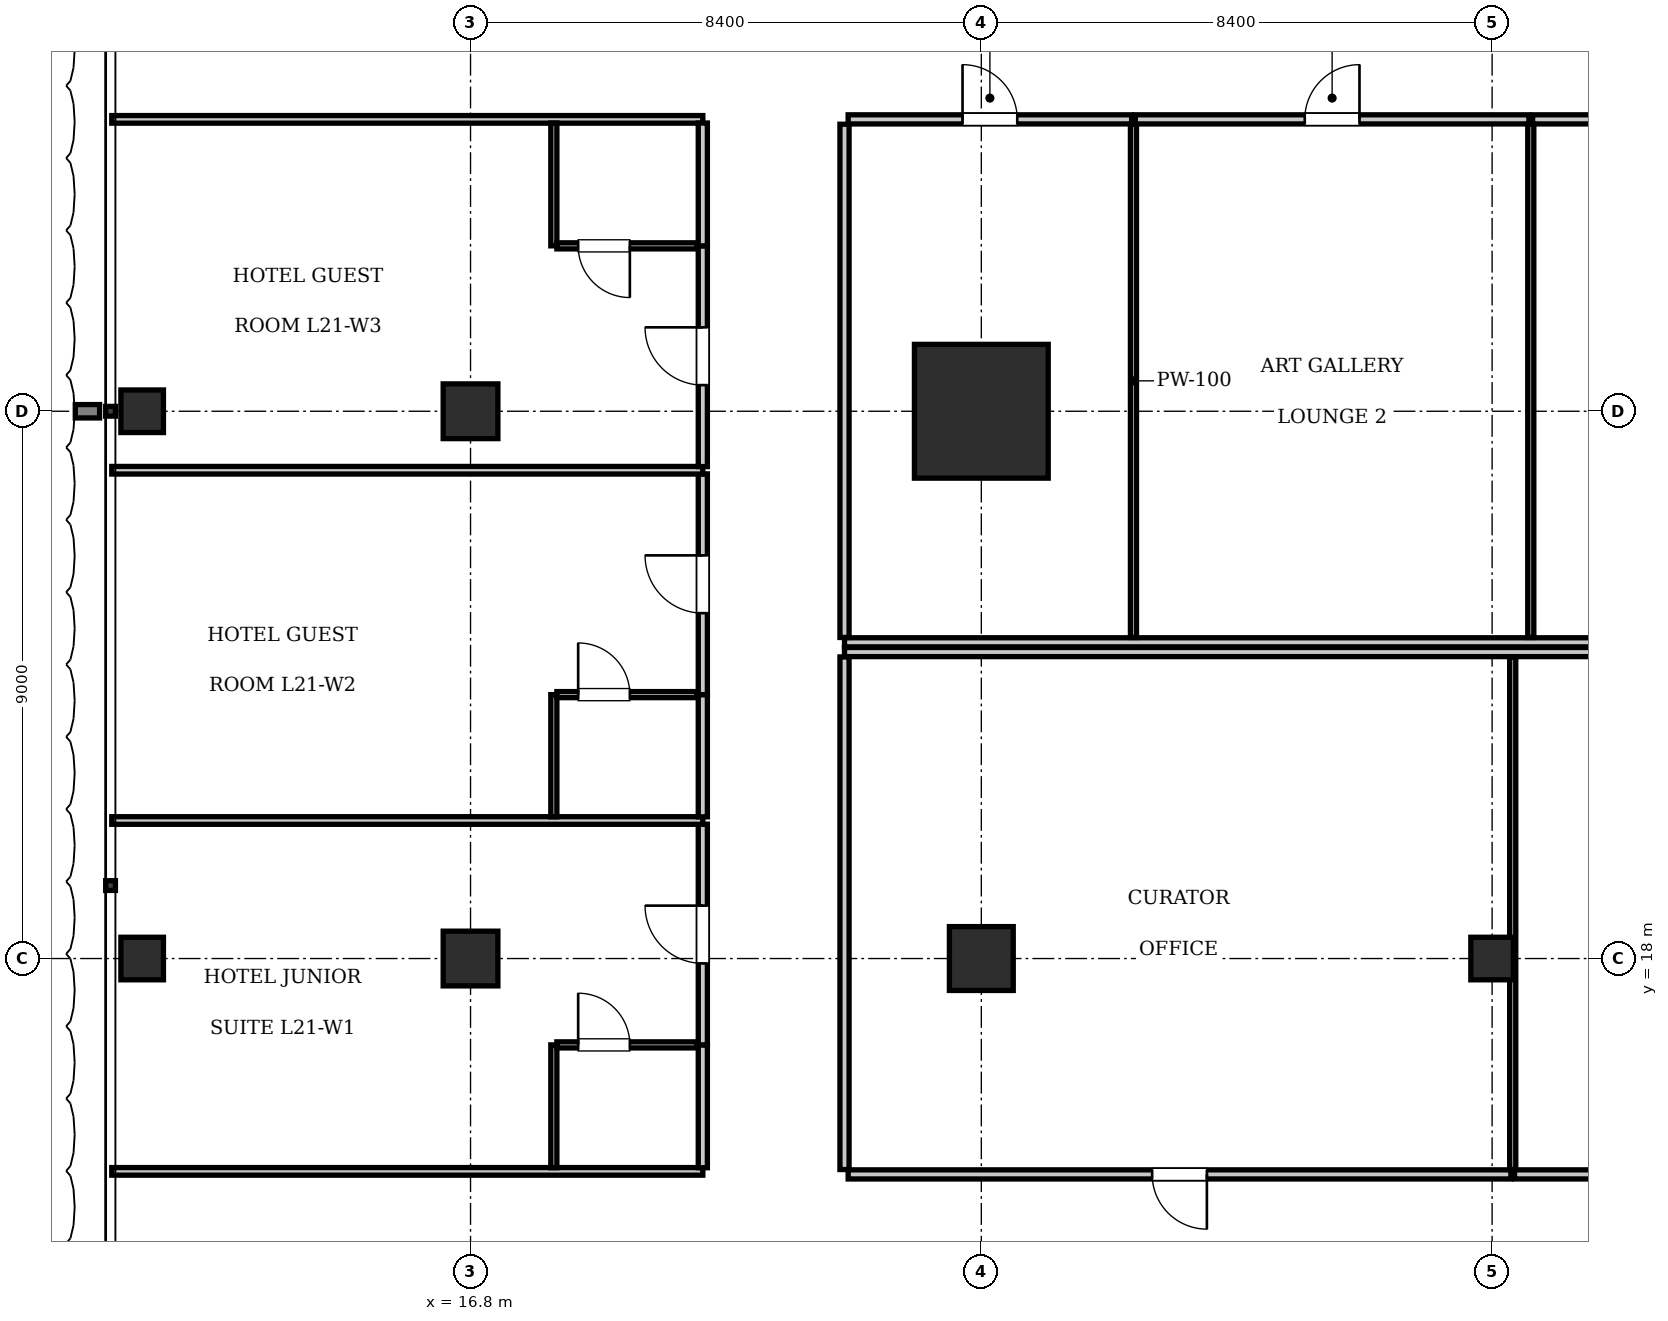
"""IFC4 building model, lengths in metres.
Left out: names, types, materials, properties, quantities, classifications, styles, units other than length and angle.
Written with IfcOpenShell. Run it as: python <this file> out.ifc"""

import sys

from ifc_helpers import new_model, si_unit, direction, frame, frame_2d, origin, origin_2d, place, context, subcontext, project, spatial, rectangle, i_section, extrude, element, fill, save


model = new_model("IFC4")
c1 = context("Model", 3, precision=1e-05, world=origin(), true_north=direction((0.0, 1.0)))
c2 = subcontext(c1, "Body", "Model", "MODEL_VIEW")
j1 = project(units=[si_unit("LENGTHUNIT", "METRE"), si_unit("PLANEANGLEUNIT", "RADIAN")], contexts=[c1])
p1 = place(None, origin())
s1 = spatial("IfcSite", under=j1, at=p1, CompositionType="ELEMENT")
p2 = place(p1, origin())
s2 = spatial("IfcBuilding", under=s1, at=p2, CompositionType="ELEMENT")
p3 = place(p2, frame((0.0, 0.0, 88.55)))
s3 = spatial("IfcBuildingStorey", under=s2, at=p3, CompositionType="ELEMENT", Elevation=88.55)
p4 = place(p3, frame((25.2, 27.0, 0.0), z_axis=(0.0, 0.0, 1.0), x_axis=(1.0, 0.0, 0.0)))
e1 = element("IfcColumn", 1, at=p4, inside=s3, PredefinedType="COLUMN", context=c2, shape_type="SweptSolid", body=[
    extrude(rectangle(XDim=2.2, YDim=2.2, at=origin_2d()), origin(), (0.0, 0.0, 1.0), 3.85),
])
p5 = place(p3, frame((25.2, 18.0, 0.0), z_axis=(0.0, 0.0, 1.0), x_axis=(1.0, 0.0, 0.0)))
e2 = element("IfcColumn", 2, at=p5, inside=s3, PredefinedType="COLUMN", context=c2, shape_type="SweptSolid", body=[
    extrude(rectangle(XDim=1.05, YDim=1.05, at=origin_2d()), origin(), (0.0, 0.0, 1.0), 3.85),
])
p6 = place(p3, frame((33.6, 18.0, 0.0), z_axis=(0.0, 0.0, 1.0), x_axis=(1.0, 0.0, 0.0)))
e3 = element("IfcColumn", 3, at=p6, inside=s3, PredefinedType="COLUMN", context=c2, shape_type="SweptSolid", body=[
    extrude(i_section(OverallWidth=0.7, OverallDepth=0.7, WebThickness=0.028, FlangeThickness=0.044, at=origin_2d()), origin(), (0.0, 0.0, 1.0), 3.85),
])
for number, where, z_axis, x_axis in (
    (4, (16.8, 18.0, 0.0), (0.0, 0.0, 1.0), (1.0, 0.0, 0.0)),
    (5, (16.8, 27.0, 0.0), (0.0, 0.0, 1.0), (1.0, 0.0, 0.0)),
):
    element("IfcColumn", number, at=place(p3, frame(where, z_axis=z_axis, x_axis=x_axis)), inside=s3, PredefinedType="COLUMN", context=c2, shape_type="SweptSolid", body=[
        extrude(rectangle(XDim=0.9, YDim=0.9, at=origin_2d()), origin(), (0.0, 0.0, 1.0), 3.85),
    ])
for number, where, z_axis, x_axis in (
    (6, (11.4, 18.0, 0.0), (0.0, 0.0, 1.0), (1.0, 0.0, 0.0)),
    (7, (11.4, 27.0, 0.0), (0.0, 0.0, 1.0), (1.0, 0.0, 0.0)),
):
    element("IfcColumn", number, at=place(p3, frame(where, z_axis=z_axis, x_axis=x_axis)), inside=s3, PredefinedType="COLUMN", context=c2, shape_type="SweptSolid", body=[
        extrude(i_section(OverallWidth=0.7, OverallDepth=0.7, WebThickness=0.028, FlangeThickness=0.044, at=origin_2d()), origin(), (0.0, 0.0, 1.0), 3.85),
    ])
p7 = place(p3, frame((22.95, 23.2, 0.0), z_axis=(0.0, 0.0, 1.0), x_axis=(1.0, 0.0, 0.0)))
e8 = element("IfcWall", 8, at=p7, inside=s3, PredefinedType="PARTITIONING", context=c2, shape_type="SweptSolid", body=[
    extrude(rectangle(XDim=29.7, YDim=0.15, at=frame_2d((14.85, 0.0))), origin(), (0.0, 0.0, 1.0), 3.61),
])
p8 = place(p3, frame((22.95, 23.28, 0.0), z_axis=(0.0, 0.0, 1.0), x_axis=(0.0, 1.0, 0.0)))
e9 = element("IfcWall", 9, at=p8, inside=s3, PredefinedType="PARTITIONING", context=c2, shape_type="SweptSolid", body=[
    extrude(rectangle(XDim=8.44, YDim=0.15, at=frame_2d((4.22, 0.0))), origin(), (0.0, 0.0, 1.0), 3.61),
])
p9 = place(p3, frame((23.01, 31.8, 0.0), z_axis=(0.0, 0.0, 1.0), x_axis=(1.0, 0.0, 0.0)))
e10 = element("IfcWall", 10, at=p9, inside=s3, PredefinedType="PARTITIONING", context=c2, shape_type="SweptSolid", body=[
    extrude(rectangle(XDim=4.662, YDim=0.15, at=frame_2d((2.331, 0.0))), origin(), (0.0, 0.0, 1.0), 3.61),
])
p10 = place(p9, frame((1.881, 0.0, 0.0)))
e11 = element("IfcOpeningElement", 11, at=p10, cuts=e10, PredefinedType="OPENING", context=c2, shape_type="SweptSolid", body=[
    extrude(rectangle(XDim=0.9, YDim=2.1, at=frame_2d((0.45, 1.05))), frame((0.0, 0.085, 0.0), z_axis=(0.0, -1.0, 0.0), x_axis=(1.0, 0.0, 0.0)), (0.0, 0.0, 1.0), 0.17),
])
p11 = place(p3, frame((27.702, 23.28, 0.0), z_axis=(0.0, 0.0, 1.0), x_axis=(0.0, 1.0, 0.0)))
e12 = element("IfcWall", 12, at=p11, inside=s3, PredefinedType="PARTITIONING", context=c2, shape_type="SweptSolid", body=[
    extrude(rectangle(XDim=8.44, YDim=0.1, at=frame_2d((4.22, 0.0))), origin(), (0.0, 0.0, 1.0), 3.61),
])
p12 = place(p3, frame((27.732, 31.8, 0.0), z_axis=(0.0, 0.0, 1.0), x_axis=(1.0, 0.0, 0.0)))
e13 = element("IfcWall", 13, at=p12, inside=s3, PredefinedType="PARTITIONING", context=c2, shape_type="SweptSolid", body=[
    extrude(rectangle(XDim=6.474, YDim=0.15, at=frame_2d((3.237, 0.0))), origin(), (0.0, 0.0, 1.0), 3.61),
])
p13 = place(p12, frame((2.787, 0.0, 0.0)))
e14 = element("IfcOpeningElement", 14, at=p13, cuts=e13, PredefinedType="OPENING", context=c2, shape_type="SweptSolid", body=[
    extrude(rectangle(XDim=0.9, YDim=2.1, at=frame_2d((0.45, 1.05))), frame((0.0, 0.085, 0.0), z_axis=(0.0, -1.0, 0.0), x_axis=(1.0, 0.0, 0.0)), (0.0, 0.0, 1.0), 0.17),
])
p14 = place(p3, frame((34.236, 23.28, 0.0), z_axis=(0.0, 0.0, 1.0), x_axis=(0.0, 1.0, 0.0)))
e15 = element("IfcWall", 15, at=p14, inside=s3, PredefinedType="PARTITIONING", context=c2, shape_type="SweptSolid", body=[
    extrude(rectangle(XDim=8.44, YDim=0.1, at=frame_2d((4.22, 0.0))), origin(), (0.0, 0.0, 1.0), 3.61),
])
p15 = place(p3, frame((34.266, 31.8, 0.0), z_axis=(0.0, 0.0, 1.0), x_axis=(1.0, 0.0, 0.0)))
e16 = element("IfcWall", 16, at=p15, inside=s3, PredefinedType="PARTITIONING", context=c2, shape_type="SweptSolid", body=[
    extrude(rectangle(XDim=8.256, YDim=0.15, at=frame_2d((4.128, 0.0))), origin(), (0.0, 0.0, 1.0), 3.61),
])
p16 = place(p15, frame((3.678, 0.0, 0.0)))
e17 = element("IfcOpeningElement", 17, at=p16, cuts=e16, PredefinedType="OPENING", context=c2, shape_type="SweptSolid", body=[
    extrude(rectangle(XDim=0.9, YDim=2.1, at=frame_2d((0.45, 1.05))), frame((0.0, 0.085, 0.0), z_axis=(0.0, -1.0, 0.0), x_axis=(1.0, 0.0, 0.0)), (0.0, 0.0, 1.0), 0.17),
])
p17 = place(p3, frame((22.95, 23.04, 0.0), z_axis=(0.0, 0.0, 1.0), x_axis=(1.0, 0.0, 0.0)))
e18 = element("IfcWall", 18, at=p17, inside=s3, PredefinedType="PARTITIONING", context=c2, shape_type="SweptSolid", body=[
    extrude(rectangle(XDim=29.7, YDim=0.15, at=frame_2d((14.85, 0.0))), origin(), (0.0, 0.0, 1.0), 3.61),
])
p18 = place(p3, frame((22.95, 14.53, 0.0), z_axis=(0.0, 0.0, 1.0), x_axis=(0.0, 1.0, 0.0)))
e19 = element("IfcWall", 19, at=p18, inside=s3, PredefinedType="PARTITIONING", context=c2, shape_type="SweptSolid", body=[
    extrude(rectangle(XDim=8.43, YDim=0.15, at=frame_2d((4.215, 0.0))), origin(), (0.0, 0.0, 1.0), 3.61),
])
p19 = place(p3, frame((23.01, 14.45, 0.0), z_axis=(0.0, 0.0, 1.0), x_axis=(1.0, 0.0, 0.0)))
e20 = element("IfcWall", 20, at=p19, inside=s3, PredefinedType="PARTITIONING", context=c2, shape_type="SweptSolid", body=[
    extrude(rectangle(XDim=10.899, YDim=0.15, at=frame_2d((5.449, 0.0))), origin(), (0.0, 0.0, 1.0), 3.61),
])
p20 = place(p19, frame((5.0, 0.0, 0.0)))
e21 = element("IfcOpeningElement", 21, at=p20, cuts=e20, PredefinedType="OPENING", context=c2, shape_type="SweptSolid", body=[
    extrude(rectangle(XDim=0.9, YDim=2.1, at=frame_2d((0.45, 1.05))), frame((0.0, 0.085, 0.0), z_axis=(0.0, -1.0, 0.0), x_axis=(1.0, 0.0, 0.0)), (0.0, 0.0, 1.0), 0.17),
])
p21 = place(p3, frame((33.939, 14.53, 0.0), z_axis=(0.0, 0.0, 1.0), x_axis=(0.0, 1.0, 0.0)))
e22 = element("IfcWall", 22, at=p21, inside=s3, PredefinedType="PARTITIONING", context=c2, shape_type="SweptSolid", body=[
    extrude(rectangle(XDim=8.43, YDim=0.1, at=frame_2d((4.215, 0.0))), origin(), (0.0, 0.0, 1.0), 3.61),
])
p22 = place(p3, frame((33.969, 14.45, 0.0), z_axis=(0.0, 0.0, 1.0), x_axis=(1.0, 0.0, 0.0)))
e23 = element("IfcWall", 23, at=p22, inside=s3, PredefinedType="PARTITIONING", context=c2, shape_type="SweptSolid", body=[
    extrude(rectangle(XDim=18.621, YDim=0.15, at=frame_2d((9.311, 0.0))), origin(), (0.0, 0.0, 1.0), 3.61),
])
p23 = place(p22, frame((8.861, 0.0, 0.0)))
e24 = element("IfcOpeningElement", 24, at=p23, cuts=e23, PredefinedType="OPENING", context=c2, shape_type="SweptSolid", body=[
    extrude(rectangle(XDim=0.9, YDim=2.1, at=frame_2d((0.45, 1.05))), frame((0.0, 0.085, 0.0), z_axis=(0.0, -1.0, 0.0), x_axis=(1.0, 0.0, 0.0)), (0.0, 0.0, 1.0), 0.17),
])
for number, where, z_axis, x_axis in (
    (25, (10.9, 14.5, 0.0), (0.0, 0.0, 1.0), (1.0, 0.0, 0.0)),
    (26, (10.9, 31.8, 0.0), (0.0, 0.0, 1.0), (1.0, 0.0, 0.0)),
):
    element("IfcWall", number, at=place(p3, frame(where, z_axis=z_axis, x_axis=x_axis)), inside=s3, PredefinedType="PARTITIONING", context=c2, shape_type="SweptSolid", body=[
        extrude(rectangle(XDim=9.72, YDim=0.125, at=frame_2d((4.86, 0.0))), origin(), (0.0, 0.0, 1.0), 3.61),
    ])
p24 = place(p3, frame((20.62, 14.56, 0.0), z_axis=(0.0, 0.0, 1.0), x_axis=(0.0, 1.0, 0.0)))
e27 = element("IfcWall", 27, at=p24, inside=s3, PredefinedType="PARTITIONING", context=c2, shape_type="SweptSolid", body=[
    extrude(rectangle(XDim=2.02, YDim=0.15, at=frame_2d((1.01, 0.0))), origin(), (0.0, 0.0, 1.0), 3.61),
])
p25 = place(p3, frame((20.62, 16.58, 0.0), z_axis=(0.0, 0.0, 1.0), x_axis=(0.0, 1.0, 0.0)))
e28 = element("IfcWall", 28, at=p25, inside=s3, PredefinedType="PARTITIONING", context=c2, shape_type="SweptSolid", body=[
    extrude(rectangle(XDim=3.63, YDim=0.15, at=frame_2d((1.815, 0.0))), origin(), (0.0, 0.0, 1.0), 3.61),
])
p26 = place(p25, frame((1.34, 0.0, 0.0)))
e29 = element("IfcOpeningElement", 29, at=p26, cuts=e28, PredefinedType="OPENING", context=c2, shape_type="SweptSolid", body=[
    extrude(rectangle(XDim=0.95, YDim=2.15, at=frame_2d((0.475, 1.075))), frame((0.0, 0.085, 0.0), z_axis=(0.0, -1.0, 0.0), x_axis=(1.0, 0.0, 0.0)), (0.0, 0.0, 1.0), 0.17),
])
p27 = place(p3, frame((18.17, 14.56, 0.0), z_axis=(0.0, 0.0, 1.0), x_axis=(0.0, 1.0, 0.0)))
e30 = element("IfcWall", 30, at=p27, inside=s3, PredefinedType="PARTITIONING", context=c2, shape_type="SweptSolid", body=[
    extrude(rectangle(XDim=2.02, YDim=0.1, at=frame_2d((1.01, 0.0))), origin(), (0.0, 0.0, 1.0), 3.61),
])
p28 = place(p3, frame((18.22, 16.58, 0.0), z_axis=(0.0, 0.0, 1.0), x_axis=(1.0, 0.0, 0.0)))
e31 = element("IfcWall", 31, at=p28, inside=s3, PredefinedType="PARTITIONING", context=c2, shape_type="SweptSolid", body=[
    extrude(rectangle(XDim=2.3, YDim=0.1, at=frame_2d((1.15, 0.0))), origin(), (0.0, 0.0, 1.0), 3.61),
])
p29 = place(p28, frame((0.35, 0.0, 0.0)))
e32 = element("IfcOpeningElement", 32, at=p29, cuts=e31, PredefinedType="OPENING", context=c2, shape_type="SweptSolid", body=[
    extrude(rectangle(XDim=0.85, YDim=2.1, at=frame_2d((0.425, 1.05))), frame((0.0, 0.06, 0.0), z_axis=(0.0, -1.0, 0.0), x_axis=(1.0, 0.0, 0.0)), (0.0, 0.0, 1.0), 0.12),
])
p30 = place(p3, frame((10.9, 20.27, 0.0), z_axis=(0.0, 0.0, 1.0), x_axis=(1.0, 0.0, 0.0)))
e33 = element("IfcWall", 33, at=p30, inside=s3, PredefinedType="PARTITIONING", context=c2, shape_type="SweptSolid", body=[
    extrude(rectangle(XDim=9.72, YDim=0.125, at=frame_2d((4.86, 0.0))), origin(), (0.0, 0.0, 1.0), 3.61),
])
p31 = place(p3, frame((20.62, 20.33, 0.0), z_axis=(0.0, 0.0, 1.0), x_axis=(0.0, 1.0, 0.0)))
e34 = element("IfcWall", 34, at=p31, inside=s3, PredefinedType="PARTITIONING", context=c2, shape_type="SweptSolid", body=[
    extrude(rectangle(XDim=2.01, YDim=0.15, at=frame_2d((1.005, 0.0))), origin(), (0.0, 0.0, 1.0), 3.61),
])
p32 = place(p3, frame((20.62, 22.34, 0.0), z_axis=(0.0, 0.0, 1.0), x_axis=(0.0, 1.0, 0.0)))
e35 = element("IfcWall", 35, at=p32, inside=s3, PredefinedType="PARTITIONING", context=c2, shape_type="SweptSolid", body=[
    extrude(rectangle(XDim=3.63, YDim=0.15, at=frame_2d((1.815, 0.0))), origin(), (0.0, 0.0, 1.0), 3.61),
])
p33 = place(p32, frame((1.34, 0.0, 0.0)))
e36 = element("IfcOpeningElement", 36, at=p33, cuts=e35, PredefinedType="OPENING", context=c2, shape_type="SweptSolid", body=[
    extrude(rectangle(XDim=0.95, YDim=2.15, at=frame_2d((0.475, 1.075))), frame((0.0, 0.085, 0.0), z_axis=(0.0, -1.0, 0.0), x_axis=(1.0, 0.0, 0.0)), (0.0, 0.0, 1.0), 0.17),
])
p34 = place(p3, frame((18.17, 20.33, 0.0), z_axis=(0.0, 0.0, 1.0), x_axis=(0.0, 1.0, 0.0)))
e37 = element("IfcWall", 37, at=p34, inside=s3, PredefinedType="PARTITIONING", context=c2, shape_type="SweptSolid", body=[
    extrude(rectangle(XDim=2.01, YDim=0.1, at=frame_2d((1.005, 0.0))), origin(), (0.0, 0.0, 1.0), 3.61),
])
p35 = place(p3, frame((18.22, 22.34, 0.0), z_axis=(0.0, 0.0, 1.0), x_axis=(1.0, 0.0, 0.0)))
e38 = element("IfcWall", 38, at=p35, inside=s3, PredefinedType="PARTITIONING", context=c2, shape_type="SweptSolid", body=[
    extrude(rectangle(XDim=2.3, YDim=0.1, at=frame_2d((1.15, 0.0))), origin(), (0.0, 0.0, 1.0), 3.61),
])
p36 = place(p35, frame((0.35, 0.0, 0.0)))
e39 = element("IfcOpeningElement", 39, at=p36, cuts=e38, PredefinedType="OPENING", context=c2, shape_type="SweptSolid", body=[
    extrude(rectangle(XDim=0.85, YDim=2.1, at=frame_2d((0.425, 1.05))), frame((0.0, 0.06, 0.0), z_axis=(0.0, -1.0, 0.0), x_axis=(1.0, 0.0, 0.0)), (0.0, 0.0, 1.0), 0.12),
])
p37 = place(p3, frame((10.9, 26.03, 0.0), z_axis=(0.0, 0.0, 1.0), x_axis=(1.0, 0.0, 0.0)))
e40 = element("IfcWall", 40, at=p37, inside=s3, PredefinedType="PARTITIONING", context=c2, shape_type="SweptSolid", body=[
    extrude(rectangle(XDim=9.72, YDim=0.125, at=frame_2d((4.86, 0.0))), origin(), (0.0, 0.0, 1.0), 3.61),
])
p38 = place(p3, frame((20.62, 26.09, 0.0), z_axis=(0.0, 0.0, 1.0), x_axis=(0.0, 1.0, 0.0)))
e41 = element("IfcWall", 41, at=p38, inside=s3, PredefinedType="PARTITIONING", context=c2, shape_type="SweptSolid", body=[
    extrude(rectangle(XDim=3.63, YDim=0.15, at=frame_2d((1.815, 0.0))), origin(), (0.0, 0.0, 1.0), 3.61),
])
p39 = place(p38, frame((1.34, 0.0, 0.0)))
e42 = element("IfcOpeningElement", 42, at=p39, cuts=e41, PredefinedType="OPENING", context=c2, shape_type="SweptSolid", body=[
    extrude(rectangle(XDim=0.95, YDim=2.15, at=frame_2d((0.475, 1.075))), frame((0.0, 0.085, 0.0), z_axis=(0.0, -1.0, 0.0), x_axis=(1.0, 0.0, 0.0)), (0.0, 0.0, 1.0), 0.17),
])
p40 = place(p3, frame((20.62, 29.72, 0.0), z_axis=(0.0, 0.0, 1.0), x_axis=(0.0, 1.0, 0.0)))
e43 = element("IfcWall", 43, at=p40, inside=s3, PredefinedType="PARTITIONING", context=c2, shape_type="SweptSolid", body=[
    extrude(rectangle(XDim=2.02, YDim=0.15, at=frame_2d((1.01, 0.0))), origin(), (0.0, 0.0, 1.0), 3.61),
])
p41 = place(p3, frame((18.17, 29.72, 0.0), z_axis=(0.0, 0.0, 1.0), x_axis=(0.0, 1.0, 0.0)))
e44 = element("IfcWall", 44, at=p41, inside=s3, PredefinedType="PARTITIONING", context=c2, shape_type="SweptSolid", body=[
    extrude(rectangle(XDim=2.02, YDim=0.1, at=frame_2d((1.01, 0.0))), origin(), (0.0, 0.0, 1.0), 3.61),
])
p42 = place(p3, frame((18.22, 29.72, 0.0), z_axis=(0.0, 0.0, 1.0), x_axis=(1.0, 0.0, 0.0)))
e45 = element("IfcWall", 45, at=p42, inside=s3, PredefinedType="PARTITIONING", context=c2, shape_type="SweptSolid", body=[
    extrude(rectangle(XDim=2.3, YDim=0.1, at=frame_2d((1.15, 0.0))), origin(), (0.0, 0.0, 1.0), 3.61),
])
p43 = place(p42, frame((0.35, 0.0, 0.0)))
e46 = element("IfcOpeningElement", 46, at=p43, cuts=e45, PredefinedType="OPENING", context=c2, shape_type="SweptSolid", body=[
    extrude(rectangle(XDim=0.85, YDim=2.1, at=frame_2d((0.425, 1.05))), frame((0.0, 0.06, 0.0), z_axis=(0.0, -1.0, 0.0), x_axis=(1.0, 0.0, 0.0)), (0.0, 0.0, 1.0), 0.12),
])
p44 = place(p10, origin())
e47 = element("IfcDoor", 47, at=p44, inside=s3, OperationType="SINGLE_SWING_LEFT", PredefinedType="DOOR", context=c2, shape_type="SweptSolid", body=[
    extrude(rectangle(XDim=0.9, YDim=2.1, at=frame_2d((0.45, 1.05))), frame((0.0, 0.025, 0.0), z_axis=(0.0, -1.0, 0.0), x_axis=(1.0, 0.0, 0.0)), (0.0, 0.0, 1.0), 0.05),
])
fill(e11, e47)
p45 = place(p13, origin())
e48 = element("IfcDoor", 48, at=p45, inside=s3, OperationType="SINGLE_SWING_RIGHT", PredefinedType="DOOR", context=c2, shape_type="SweptSolid", body=[
    extrude(rectangle(XDim=0.9, YDim=2.1, at=frame_2d((0.45, 1.05))), frame((0.0, 0.025, 0.0), z_axis=(0.0, -1.0, 0.0), x_axis=(1.0, 0.0, 0.0)), (0.0, 0.0, 1.0), 0.05),
])
fill(e14, e48)
p46 = place(p20, frame((0.9, 0.0, 0.0), z_axis=(0.0, 0.0, 1.0), x_axis=(-1.0, 0.0, 0.0)))
e49 = element("IfcDoor", 49, at=p46, inside=s3, OperationType="SINGLE_SWING_LEFT", PredefinedType="DOOR", context=c2, shape_type="SweptSolid", body=[
    extrude(rectangle(XDim=0.9, YDim=2.1, at=frame_2d((0.45, 1.05))), frame((0.0, 0.025, 0.0), z_axis=(0.0, -1.0, 0.0), x_axis=(1.0, 0.0, 0.0)), (0.0, 0.0, 1.0), 0.05),
])
fill(e21, e49)
p47 = place(p29, origin())
e50 = element("IfcDoor", 50, at=p47, inside=s3, OperationType="SINGLE_SWING_LEFT", PredefinedType="DOOR", context=c2, shape_type="SweptSolid", body=[
    extrude(rectangle(XDim=0.85, YDim=2.1, at=frame_2d((0.425, 1.05))), frame((0.0, 0.025, 0.0), z_axis=(0.0, -1.0, 0.0), x_axis=(1.0, 0.0, 0.0)), (0.0, 0.0, 1.0), 0.05),
])
fill(e32, e50)
p48 = place(p26, origin())
e51 = element("IfcDoor", 51, at=p48, inside=s3, OperationType="SINGLE_SWING_RIGHT", PredefinedType="DOOR", context=c2, shape_type="SweptSolid", body=[
    extrude(rectangle(XDim=0.95, YDim=2.15, at=frame_2d((0.475, 1.075))), frame((0.0, 0.025, 0.0), z_axis=(0.0, -1.0, 0.0), x_axis=(1.0, 0.0, 0.0)), (0.0, 0.0, 1.0), 0.05),
])
fill(e29, e51)
p49 = place(p36, origin())
e52 = element("IfcDoor", 52, at=p49, inside=s3, OperationType="SINGLE_SWING_LEFT", PredefinedType="DOOR", context=c2, shape_type="SweptSolid", body=[
    extrude(rectangle(XDim=0.85, YDim=2.1, at=frame_2d((0.425, 1.05))), frame((0.0, 0.025, 0.0), z_axis=(0.0, -1.0, 0.0), x_axis=(1.0, 0.0, 0.0)), (0.0, 0.0, 1.0), 0.05),
])
fill(e39, e52)
p50 = place(p33, origin())
e53 = element("IfcDoor", 53, at=p50, inside=s3, OperationType="SINGLE_SWING_RIGHT", PredefinedType="DOOR", context=c2, shape_type="SweptSolid", body=[
    extrude(rectangle(XDim=0.95, YDim=2.15, at=frame_2d((0.475, 1.075))), frame((0.0, 0.025, 0.0), z_axis=(0.0, -1.0, 0.0), x_axis=(1.0, 0.0, 0.0)), (0.0, 0.0, 1.0), 0.05),
])
fill(e36, e53)
p51 = place(p43, frame((0.85, 0.0, 0.0), z_axis=(0.0, 0.0, 1.0), x_axis=(-1.0, 0.0, 0.0)))
e54 = element("IfcDoor", 54, at=p51, inside=s3, OperationType="SINGLE_SWING_LEFT", PredefinedType="DOOR", context=c2, shape_type="SweptSolid", body=[
    extrude(rectangle(XDim=0.85, YDim=2.1, at=frame_2d((0.425, 1.05))), frame((0.0, 0.025, 0.0), z_axis=(0.0, -1.0, 0.0), x_axis=(1.0, 0.0, 0.0)), (0.0, 0.0, 1.0), 0.05),
])
fill(e46, e54)
p52 = place(p39, origin())
e55 = element("IfcDoor", 55, at=p52, inside=s3, OperationType="SINGLE_SWING_RIGHT", PredefinedType="DOOR", context=c2, shape_type="SweptSolid", body=[
    extrude(rectangle(XDim=0.95, YDim=2.15, at=frame_2d((0.475, 1.075))), frame((0.0, 0.025, 0.0), z_axis=(0.0, -1.0, 0.0), x_axis=(1.0, 0.0, 0.0)), (0.0, 0.0, 1.0), 0.05),
])
fill(e42, e55)
save(model, sys.argv[1])
